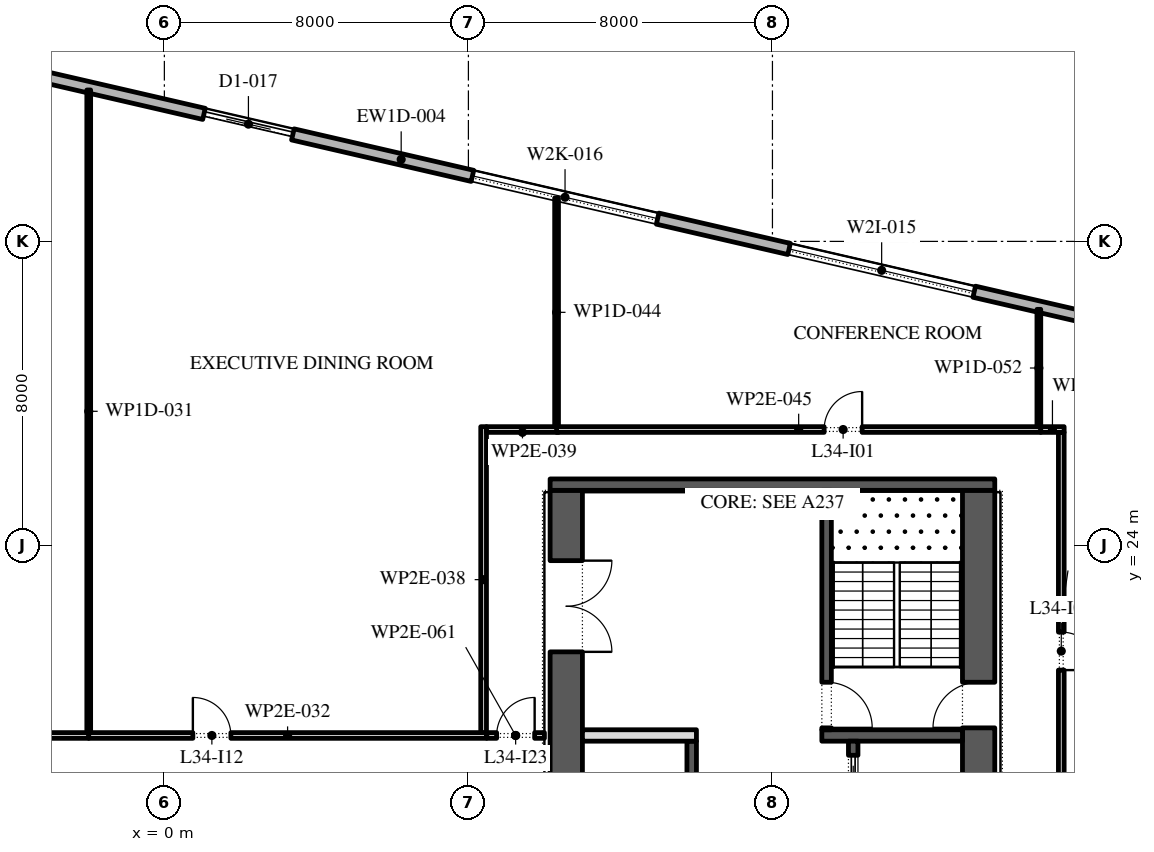
"""IFC4 building model, lengths in metres.
Left out: names, types, materials, properties, quantities, classifications, styles, units other than length and angle.
Written with IfcOpenShell. Run it as: python <this file> out.ifc"""

import sys

from ifc_helpers import new_model, si_unit, direction, frame, frame_2d, origin, place, context, subcontext, project, spatial, rectangle, extrude, element, fill, save


model = new_model("IFC4")
c1 = context("Model", 3, precision=1e-05, world=origin(), true_north=direction((0.0, 1.0)))
c2 = subcontext(c1, "Body", "Model", "MODEL_VIEW")
j1 = project(units=[si_unit("LENGTHUNIT", "METRE"), si_unit("PLANEANGLEUNIT", "RADIAN")], contexts=[c1])
p1 = place(None, origin())
s1 = spatial("IfcSite", under=j1, at=p1, CompositionType="ELEMENT")
p2 = place(p1, origin())
s2 = spatial("IfcBuilding", under=s1, at=p2, CompositionType="ELEMENT")
p3 = place(p2, frame((0.0, 0.0, 156.0)))
s3 = spatial("IfcBuildingStorey", under=s2, at=p3, CompositionType="ELEMENT", Elevation=156.0)
p4 = place(p3, frame((31.078, 28.421, 0.0), z_axis=(0.0, 0.0, 1.0), x_axis=(-0.974370456532, 0.224949357493, 0.0)))
e1 = element("IfcWall", 1, at=p4, inside=s3, PredefinedType="STANDARD", context=c2, shape_type="SweptSolid", body=[
    extrude(rectangle(XDim=51.0, YDim=0.3, at=frame_2d((25.5, 0.0))), origin(), (0.0, 0.0, 1.0), 3.9),
])
p5 = place(p4, frame((1.625, 0.0, 0.45)))
e2 = element("IfcOpeningElement", 2, at=p5, cuts=e1, PredefinedType="OPENING", context=c2, shape_type="SweptSolid", body=[
    extrude(rectangle(XDim=5.0, YDim=2.725, at=frame_2d((2.5, 1.363))), frame((0.0, 0.16, 0.0), z_axis=(0.0, -1.0, 0.0), x_axis=(1.0, 0.0, 0.0)), (0.0, 0.0, 1.0), 0.32),
])
p6 = place(p4, frame((10.025, 0.0, 0.45)))
e3 = element("IfcOpeningElement", 3, at=p6, cuts=e1, PredefinedType="OPENING", context=c2, shape_type="SweptSolid", body=[
    extrude(rectangle(XDim=5.0, YDim=2.65, at=frame_2d((2.5, 1.325))), frame((0.0, 0.16, 0.0), z_axis=(0.0, -1.0, 0.0), x_axis=(1.0, 0.0, 0.0)), (0.0, 0.0, 1.0), 0.32),
])
p7 = place(p4, frame((18.575, 0.0, 0.45)))
e4 = element("IfcOpeningElement", 4, at=p7, cuts=e1, PredefinedType="OPENING", context=c2, shape_type="SweptSolid", body=[
    extrude(rectangle(XDim=5.0, YDim=2.575, at=frame_2d((2.5, 1.288))), frame((0.0, 0.16, 0.0), z_axis=(0.0, -1.0, 0.0), x_axis=(1.0, 0.0, 0.0)), (0.0, 0.0, 1.0), 0.32),
])
p8 = place(p4, frame((28.425, 0.0, 0.0)))
e5 = element("IfcOpeningElement", 5, at=p8, cuts=e1, PredefinedType="OPENING", context=c2, shape_type="SweptSolid", body=[
    extrude(rectangle(XDim=2.4, YDim=3.5, at=frame_2d((1.2, 1.75))), frame((0.0, 0.16, 0.0), z_axis=(0.0, -1.0, 0.0), x_axis=(1.0, 0.0, 0.0)), (0.0, 0.0, 1.0), 0.32),
])
p9 = place(p4, frame((35.675, 0.0, 0.45)))
e6 = element("IfcOpeningElement", 6, at=p9, cuts=e1, PredefinedType="OPENING", context=c2, shape_type="SweptSolid", body=[
    extrude(rectangle(XDim=5.0, YDim=2.4, at=frame_2d((2.5, 1.2))), frame((0.0, 0.16, 0.0), z_axis=(0.0, -1.0, 0.0), x_axis=(1.0, 0.0, 0.0)), (0.0, 0.0, 1.0), 0.32),
])
p10 = place(p4, frame((44.225, 0.0, 0.45)))
e7 = element("IfcOpeningElement", 7, at=p10, cuts=e1, PredefinedType="OPENING", context=c2, shape_type="SweptSolid", body=[
    extrude(rectangle(XDim=5.0, YDim=3.25, at=frame_2d((2.5, 1.625))), frame((0.0, 0.16, 0.0), z_axis=(0.0, -1.0, 0.0), x_axis=(1.0, 0.0, 0.0)), (0.0, 0.0, 1.0), 0.32),
])
p11 = place(p3, frame((21.425, -2.45, 0.0), z_axis=(0.0, 0.0, 1.0), x_axis=(0.0, 1.0, 0.0)))
e8 = element("IfcWall", 8, at=p11, inside=s3, PredefinedType="SHEAR", context=c2, shape_type="SweptSolid", body=[
    extrude(rectangle(XDim=27.9, YDim=0.85, at=frame_2d((13.95, 0.0))), origin(), (0.0, 0.0, 1.0), 3.9),
])
p12 = place(p11, frame((5.05, 0.0, 0.0)))
e9 = element("IfcOpeningElement", 9, at=p12, cuts=e8, PredefinedType="OPENING", context=c2, shape_type="SweptSolid", body=[
    extrude(rectangle(XDim=1.2, YDim=2.1, at=frame_2d((0.6, 1.05))), frame((0.0, 0.435, 0.0), z_axis=(0.0, -1.0, 0.0), x_axis=(1.0, 0.0, 0.0)), (0.0, 0.0, 1.0), 0.87),
])
p13 = place(p11, frame((21.65, 0.0, 0.0)))
e10 = element("IfcOpeningElement", 10, at=p13, cuts=e8, PredefinedType="OPENING", context=c2, shape_type="SweptSolid", body=[
    extrude(rectangle(XDim=1.2, YDim=2.1, at=frame_2d((0.6, 1.05))), frame((0.0, 0.435, 0.0), z_axis=(0.0, -1.0, 0.0), x_axis=(1.0, 0.0, 0.0)), (0.0, 0.0, 1.0), 0.87),
])
p14 = place(p3, frame((10.575, -2.45, 0.0), z_axis=(0.0, 0.0, 1.0), x_axis=(0.0, 1.0, 0.0)))
e11 = element("IfcWall", 11, at=p14, inside=s3, PredefinedType="SHEAR", context=c2, shape_type="SweptSolid", body=[
    extrude(rectangle(XDim=27.9, YDim=0.85, at=frame_2d((13.95, 0.0))), origin(), (0.0, 0.0, 1.0), 3.9),
])
p15 = place(p14, frame((23.65, 0.0, 0.0)))
e12 = element("IfcOpeningElement", 12, at=p15, cuts=e11, PredefinedType="OPENING", context=c2, shape_type="SweptSolid", body=[
    extrude(rectangle(XDim=2.4, YDim=2.1, at=frame_2d((1.2, 1.05))), frame((0.0, 0.435, 0.0), z_axis=(0.0, -1.0, 0.0), x_axis=(1.0, 0.0, 0.0)), (0.0, 0.0, 1.0), 0.87),
])
p16 = place(p14, frame((1.087, 0.0, 0.0)))
e13 = element("IfcOpeningElement", 13, at=p16, cuts=e11, PredefinedType="OPENING", context=c2, shape_type="SweptSolid", body=[
    extrude(rectangle(XDim=0.9, YDim=2.1, at=frame_2d((0.45, 1.05))), frame((0.0, 0.435, 0.0), z_axis=(0.0, -1.0, 0.0), x_axis=(1.0, 0.0, 0.0)), (0.0, 0.0, 1.0), 0.87),
])
p17 = place(p14, frame((4.262, 0.0, 0.0)))
e14 = element("IfcOpeningElement", 14, at=p17, cuts=e11, PredefinedType="OPENING", context=c2, shape_type="SweptSolid", body=[
    extrude(rectangle(XDim=1.0, YDim=2.1, at=frame_2d((0.5, 1.05))), frame((0.0, 0.435, 0.0), z_axis=(0.0, -1.0, 0.0), x_axis=(1.0, 0.0, 0.0)), (0.0, 0.0, 1.0), 0.87),
])
p18 = place(p3, frame((10.15, 25.6, 0.0), z_axis=(0.0, 0.0, 1.0), x_axis=(1.0, 0.0, 0.0)))
e15 = element("IfcWall", 15, at=p18, inside=s3, PredefinedType="SHEAR", context=c2, shape_type="SweptSolid", body=[
    extrude(rectangle(XDim=11.7, YDim=0.3, at=frame_2d((5.85, 0.0))), origin(), (0.0, 0.0, 1.0), 3.9),
])
p19 = place(p3, frame((17.3, 19.0, 0.0), z_axis=(0.0, 0.0, 1.0), x_axis=(1.0, 0.0, 0.0)))
e16 = element("IfcWall", 16, at=p19, inside=s3, PredefinedType="SHEAR", context=c2, shape_type="SweptSolid", body=[
    extrude(rectangle(XDim=3.7, YDim=0.3, at=frame_2d((1.85, 0.0))), origin(), (0.0, 0.0, 1.0), 3.9),
])
p20 = place(p3, frame((17.425, 19.15, 0.0), z_axis=(0.0, 0.0, 1.0), x_axis=(0.0, 1.0, 0.0)))
e17 = element("IfcWall", 17, at=p20, inside=s3, PredefinedType="SHEAR", context=c2, shape_type="SweptSolid", body=[
    extrude(rectangle(XDim=6.3, YDim=0.25, at=frame_2d((3.15, 0.0))), origin(), (0.0, 0.0, 1.0), 3.9),
])
p21 = place(p20, frame((0.05, 0.0, 0.0)))
e18 = element("IfcOpeningElement", 18, at=p21, cuts=e17, PredefinedType="OPENING", context=c2, shape_type="SweptSolid", body=[
    extrude(rectangle(XDim=1.2, YDim=2.1, at=frame_2d((0.6, 1.05))), frame((0.0, 0.135, 0.0), z_axis=(0.0, -1.0, 0.0), x_axis=(1.0, 0.0, 0.0)), (0.0, 0.0, 1.0), 0.27),
])
p22 = place(p3, frame((18.125, 4.15, 0.0), z_axis=(0.0, 0.0, 1.0), x_axis=(0.0, 1.0, 0.0)))
e19 = element("IfcWall", 19, at=p22, inside=s3, PredefinedType="SHEAR", context=c2, shape_type="SweptSolid", body=[
    extrude(rectangle(XDim=14.7, YDim=0.25, at=frame_2d((7.35, 0.0))), origin(), (0.0, 0.0, 1.0), 3.9),
])
p23 = place(p22, frame((0.371, 0.0, 0.0)))
e20 = element("IfcOpeningElement", 20, at=p23, cuts=e19, PredefinedType="OPENING", context=c2, shape_type="SweptSolid", body=[
    extrude(rectangle(XDim=1.1, YDim=2.1, at=frame_2d((0.55, 1.05))), frame((0.0, 0.135, 0.0), z_axis=(0.0, -1.0, 0.0), x_axis=(1.0, 0.0, 0.0)), (0.0, 0.0, 1.0), 0.27),
])
p24 = place(p22, frame((2.514, 0.0, 0.0)))
e21 = element("IfcOpeningElement", 21, at=p24, cuts=e19, PredefinedType="OPENING", context=c2, shape_type="SweptSolid", body=[
    extrude(rectangle(XDim=1.1, YDim=2.1, at=frame_2d((0.55, 1.05))), frame((0.0, 0.135, 0.0), z_axis=(0.0, -1.0, 0.0), x_axis=(1.0, 0.0, 0.0)), (0.0, 0.0, 1.0), 0.27),
])
p25 = place(p22, frame((4.657, 0.0, 0.0)))
e22 = element("IfcOpeningElement", 22, at=p25, cuts=e19, PredefinedType="OPENING", context=c2, shape_type="SweptSolid", body=[
    extrude(rectangle(XDim=1.1, YDim=2.1, at=frame_2d((0.55, 1.05))), frame((0.0, 0.135, 0.0), z_axis=(0.0, -1.0, 0.0), x_axis=(1.0, 0.0, 0.0)), (0.0, 0.0, 1.0), 0.27),
])
p26 = place(p22, frame((6.8, 0.0, 0.0)))
e23 = element("IfcOpeningElement", 23, at=p26, cuts=e19, PredefinedType="OPENING", context=c2, shape_type="SweptSolid", body=[
    extrude(rectangle(XDim=1.1, YDim=2.1, at=frame_2d((0.55, 1.05))), frame((0.0, 0.135, 0.0), z_axis=(0.0, -1.0, 0.0), x_axis=(1.0, 0.0, 0.0)), (0.0, 0.0, 1.0), 0.27),
])
p27 = place(p22, frame((8.943, 0.0, 0.0)))
e24 = element("IfcOpeningElement", 24, at=p27, cuts=e19, PredefinedType="OPENING", context=c2, shape_type="SweptSolid", body=[
    extrude(rectangle(XDim=1.1, YDim=2.1, at=frame_2d((0.55, 1.05))), frame((0.0, 0.135, 0.0), z_axis=(0.0, -1.0, 0.0), x_axis=(1.0, 0.0, 0.0)), (0.0, 0.0, 1.0), 0.27),
])
p28 = place(p22, frame((11.086, 0.0, 0.0)))
e25 = element("IfcOpeningElement", 25, at=p28, cuts=e19, PredefinedType="OPENING", context=c2, shape_type="SweptSolid", body=[
    extrude(rectangle(XDim=1.1, YDim=2.1, at=frame_2d((0.55, 1.05))), frame((0.0, 0.135, 0.0), z_axis=(0.0, -1.0, 0.0), x_axis=(1.0, 0.0, 0.0)), (0.0, 0.0, 1.0), 0.27),
])
p29 = place(p22, frame((13.229, 0.0, 0.0)))
e26 = element("IfcOpeningElement", 26, at=p29, cuts=e19, PredefinedType="OPENING", context=c2, shape_type="SweptSolid", body=[
    extrude(rectangle(XDim=1.1, YDim=2.1, at=frame_2d((0.55, 1.05))), frame((0.0, 0.135, 0.0), z_axis=(0.0, -1.0, 0.0), x_axis=(1.0, 0.0, 0.0)), (0.0, 0.0, 1.0), 0.27),
])
p30 = place(p3, frame((13.875, -2.45, 0.0), z_axis=(0.0, 0.0, 1.0), x_axis=(0.0, 1.0, 0.0)))
e27 = element("IfcWall", 27, at=p30, inside=s3, PredefinedType="SHEAR", context=c2, shape_type="SweptSolid", body=[
    extrude(rectangle(XDim=21.3, YDim=0.25, at=frame_2d((10.65, 0.0))), origin(), (0.0, 0.0, 1.0), 3.9),
])
p31 = place(p30, frame((14.571, 0.0, 0.0)))
e28 = element("IfcOpeningElement", 28, at=p31, cuts=e27, PredefinedType="OPENING", context=c2, shape_type="SweptSolid", body=[
    extrude(rectangle(XDim=0.9, YDim=2.1, at=frame_2d((0.45, 1.05))), frame((0.0, 0.135, 0.0), z_axis=(0.0, -1.0, 0.0), x_axis=(1.0, 0.0, 0.0)), (0.0, 0.0, 1.0), 0.27),
])
p32 = place(p30, frame((6.971, 0.0, 0.0)))
e29 = element("IfcOpeningElement", 29, at=p32, cuts=e27, PredefinedType="OPENING", context=c2, shape_type="SweptSolid", body=[
    extrude(rectangle(XDim=1.1, YDim=2.1, at=frame_2d((0.55, 1.05))), frame((0.0, 0.135, 0.0), z_axis=(0.0, -1.0, 0.0), x_axis=(1.0, 0.0, 0.0)), (0.0, 0.0, 1.0), 0.27),
])
p33 = place(p3, frame((11.0, 19.0, 0.0), z_axis=(0.0, 0.0, 1.0), x_axis=(1.0, 0.0, 0.0)))
e30 = element("IfcWall", 30, at=p33, inside=s3, PredefinedType="PARTITIONING", context=c2, shape_type="SweptSolid", body=[
    extrude(rectangle(XDim=3.0, YDim=0.3, at=frame_2d((1.5, 0.0))), origin(), (0.0, 0.0, 1.0), 3.9),
])
p34 = place(p3, frame((-8.475, 19.0, 0.0), z_axis=(0.0, 0.0, 1.0), x_axis=(1.0, 0.0, 0.0)))
e31 = element("IfcWall", 31, at=p34, inside=s3, PredefinedType="PARTITIONING", context=c2, shape_type="SweptSolid", body=[
    extrude(rectangle(XDim=6.485, YDim=0.15, at=frame_2d((3.243, 0.0))), origin(), (0.0, 0.0, 1.0), 3.9),
])
p35 = place(p3, frame((-1.99, 19.075, 0.0), z_axis=(0.0, 0.0, 1.0), x_axis=(0.0, 1.0, 0.0)))
e32 = element("IfcWall", 32, at=p35, inside=s3, PredefinedType="PARTITIONING", context=c2, shape_type="SweptSolid", body=[
    extrude(rectangle(XDim=16.909, YDim=0.1, at=frame_2d((8.455, 0.0))), origin(), (0.0, 0.0, 1.0), 3.9),
])
p36 = place(p3, frame((-1.99, 19.0, 0.0), z_axis=(0.0, 0.0, 1.0), x_axis=(1.0, 0.0, 0.0)))
e33 = element("IfcWall", 33, at=p36, inside=s3, PredefinedType="PARTITIONING", context=c2, shape_type="SweptSolid", body=[
    extrude(rectangle(XDim=10.465, YDim=0.15, at=frame_2d((5.232, 0.0))), origin(), (0.0, 0.0, 1.0), 3.9),
])
p37 = place(p36, frame((2.74, 0.0, 0.0)))
e34 = element("IfcOpeningElement", 34, at=p37, cuts=e33, PredefinedType="OPENING", context=c2, shape_type="SweptSolid", body=[
    extrude(rectangle(XDim=1.0, YDim=2.1, at=frame_2d((0.5, 1.05))), frame((0.0, 0.085, 0.0), z_axis=(0.0, -1.0, 0.0), x_axis=(1.0, 0.0, 0.0)), (0.0, 0.0, 1.0), 0.17),
])
p38 = place(p3, frame((8.4, 19.075, 0.0), z_axis=(0.0, 0.0, 1.0), x_axis=(0.0, 1.0, 0.0)))
e35 = element("IfcWall", 35, at=p38, inside=s3, PredefinedType="PARTITIONING", context=c2, shape_type="SweptSolid", body=[
    extrude(rectangle(XDim=8.05, YDim=0.15, at=frame_2d((4.025, 0.0))), origin(), (0.0, 0.0, 1.0), 3.9),
])
p39 = place(p3, frame((8.475, 27.05, 0.0), z_axis=(0.0, 0.0, 1.0), x_axis=(1.0, 0.0, 0.0)))
e36 = element("IfcWall", 36, at=p39, inside=s3, PredefinedType="PARTITIONING", context=c2, shape_type="SweptSolid", body=[
    extrude(rectangle(XDim=1.895, YDim=0.15, at=frame_2d((0.948, 0.0))), origin(), (0.0, 0.0, 1.0), 3.9),
])
p40 = place(p3, frame((10.32, 27.125, 0.0), z_axis=(0.0, 0.0, 1.0), x_axis=(0.0, 1.0, 0.0)))
e37 = element("IfcWall", 37, at=p40, inside=s3, PredefinedType="PARTITIONING", context=c2, shape_type="SweptSolid", body=[
    extrude(rectangle(XDim=6.017, YDim=0.1, at=frame_2d((3.009, 0.0))), origin(), (0.0, 0.0, 1.0), 3.9),
])
p41 = place(p3, frame((10.32, 27.05, 0.0), z_axis=(0.0, 0.0, 1.0), x_axis=(1.0, 0.0, 0.0)))
e38 = element("IfcWall", 38, at=p41, inside=s3, PredefinedType="PARTITIONING", context=c2, shape_type="SweptSolid", body=[
    extrude(rectangle(XDim=12.74, YDim=0.15, at=frame_2d((6.37, 0.0))), origin(), (0.0, 0.0, 1.0), 3.9),
])
p42 = place(p41, frame((7.04, 0.0, 0.0)))
e39 = element("IfcOpeningElement", 39, at=p42, cuts=e38, PredefinedType="OPENING", context=c2, shape_type="SweptSolid", body=[
    extrude(rectangle(XDim=1.0, YDim=2.1, at=frame_2d((0.5, 1.05))), frame((0.0, 0.085, 0.0), z_axis=(0.0, -1.0, 0.0), x_axis=(1.0, 0.0, 0.0)), (0.0, 0.0, 1.0), 0.17),
])
p43 = place(p3, frame((23.06, 27.05, 0.0), z_axis=(0.0, 0.0, 1.0), x_axis=(1.0, 0.0, 0.0)))
e40 = element("IfcWall", 40, at=p43, inside=s3, PredefinedType="PARTITIONING", context=c2, shape_type="SweptSolid", body=[
    extrude(rectangle(XDim=0.615, YDim=0.15, at=frame_2d((0.308, 0.0))), origin(), (0.0, 0.0, 1.0), 3.9),
])
p44 = place(p3, frame((23.01, 30.212, 0.0), z_axis=(0.0, 0.0, 1.0), x_axis=(0.0, -1.0, 0.0)))
e41 = element("IfcWall", 41, at=p44, inside=s3, PredefinedType="PARTITIONING", context=c2, shape_type="SweptSolid", body=[
    extrude(rectangle(XDim=3.087, YDim=0.1, at=frame_2d((1.543, 0.0))), origin(), (0.0, 0.0, 1.0), 3.9),
])
p45 = place(p3, frame((23.6, 26.975, 0.0), z_axis=(0.0, 0.0, 1.0), x_axis=(0.0, -1.0, 0.0)))
e42 = element("IfcWall", 42, at=p45, inside=s3, PredefinedType="PARTITIONING", context=c2, shape_type="SweptSolid", body=[
    extrude(rectangle(XDim=9.655, YDim=0.15, at=frame_2d((4.828, 0.0))), origin(), (0.0, 0.0, 1.0), 3.9),
])
p46 = place(p45, frame((5.255, 0.0, 0.0)))
e43 = element("IfcOpeningElement", 43, at=p46, cuts=e42, PredefinedType="OPENING", context=c2, shape_type="SweptSolid", body=[
    extrude(rectangle(XDim=1.0, YDim=2.1, at=frame_2d((0.5, 1.05))), frame((0.0, 0.085, 0.0), z_axis=(0.0, -1.0, 0.0), x_axis=(1.0, 0.0, 0.0)), (0.0, 0.0, 1.0), 0.17),
])
p47 = place(p3, frame((8.485, 19.0, 0.0), z_axis=(0.0, 0.0, 1.0), x_axis=(1.0, 0.0, 0.0)))
e44 = element("IfcWall", 44, at=p47, inside=s3, PredefinedType="PARTITIONING", context=c2, shape_type="SweptSolid", body=[
    extrude(rectangle(XDim=1.515, YDim=0.15, at=frame_2d((0.757, 0.0))), origin(), (0.0, 0.0, 1.0), 3.9),
])
p48 = place(p47, frame((0.258, 0.0, 0.0)))
e45 = element("IfcOpeningElement", 45, at=p48, cuts=e44, PredefinedType="OPENING", context=c2, shape_type="SweptSolid", body=[
    extrude(rectangle(XDim=1.0, YDim=2.1, at=frame_2d((0.5, 1.05))), frame((0.0, 0.085, 0.0), z_axis=(0.0, -1.0, 0.0), x_axis=(1.0, 0.0, 0.0)), (0.0, 0.0, 1.0), 0.17),
])
p49 = place(p6, origin())
e46 = element("IfcWindow", 46, at=p49, inside=s3, PartitioningType="DOUBLE_PANEL_VERTICAL", PredefinedType="WINDOW", context=c2, shape_type="SweptSolid", body=[
    extrude(rectangle(XDim=5.0, YDim=2.65, at=frame_2d((2.5, 1.325))), frame((0.0, 0.03, 0.0), z_axis=(0.0, -1.0, 0.0), x_axis=(1.0, 0.0, 0.0)), (0.0, 0.0, 1.0), 0.06),
])
fill(e3, e46)
p50 = place(p7, origin())
e47 = element("IfcWindow", 47, at=p50, inside=s3, PartitioningType="DOUBLE_PANEL_VERTICAL", PredefinedType="WINDOW", context=c2, shape_type="SweptSolid", body=[
    extrude(rectangle(XDim=5.0, YDim=2.575, at=frame_2d((2.5, 1.288))), frame((0.0, 0.03, 0.0), z_axis=(0.0, -1.0, 0.0), x_axis=(1.0, 0.0, 0.0)), (0.0, 0.0, 1.0), 0.06),
])
fill(e4, e47)
p51 = place(p8, origin())
e48 = element("IfcDoor", 48, at=p51, inside=s3, OperationType="DOUBLE_DOOR_SLIDING", PredefinedType="DOOR", context=c2, shape_type="SweptSolid", body=[
    extrude(rectangle(XDim=2.4, YDim=3.5, at=frame_2d((1.2, 1.75))), frame((0.0, 0.025, 0.0), z_axis=(0.0, -1.0, 0.0), x_axis=(1.0, 0.0, 0.0)), (0.0, 0.0, 1.0), 0.05),
])
fill(e5, e48)
p52 = place(p29, origin())
e49 = element("IfcDoor", 49, at=p52, inside=s3, OperationType="SLIDING_TO_LEFT", PredefinedType="DOOR", context=c2, shape_type="SweptSolid", body=[
    extrude(rectangle(XDim=1.1, YDim=2.1, at=frame_2d((0.55, 1.05))), frame((0.0, 0.025, 0.0), z_axis=(0.0, -1.0, 0.0), x_axis=(1.0, 0.0, 0.0)), (0.0, 0.0, 1.0), 0.05),
])
fill(e26, e49)
p53 = place(p15, frame((2.4, 0.0, 0.0), z_axis=(0.0, 0.0, 1.0), x_axis=(-1.0, 0.0, 0.0)))
e50 = element("IfcDoor", 50, at=p53, inside=s3, OperationType="DOUBLE_DOOR_SINGLE_SWING", PredefinedType="DOOR", context=c2, shape_type="SweptSolid", body=[
    extrude(rectangle(XDim=2.4, YDim=2.1, at=frame_2d((1.2, 1.05))), frame((0.0, 0.025, 0.0), z_axis=(0.0, -1.0, 0.0), x_axis=(1.0, 0.0, 0.0)), (0.0, 0.0, 1.0), 0.05),
])
fill(e12, e50)
p54 = place(p21, frame((1.2, 0.0, 0.0), z_axis=(0.0, 0.0, 1.0), x_axis=(-1.0, 0.0, 0.0)))
e51 = element("IfcDoor", 51, at=p54, inside=s3, OperationType="SINGLE_SWING_LEFT", PredefinedType="DOOR", context=c2, shape_type="SweptSolid", body=[
    extrude(rectangle(XDim=1.2, YDim=2.1, at=frame_2d((0.6, 1.05))), frame((0.0, 0.025, 0.0), z_axis=(0.0, -1.0, 0.0), x_axis=(1.0, 0.0, 0.0)), (0.0, 0.0, 1.0), 0.05),
])
fill(e18, e51)
p55 = place(p13, origin())
e52 = element("IfcDoor", 52, at=p55, inside=s3, OperationType="SINGLE_SWING_RIGHT", PredefinedType="DOOR", context=c2, shape_type="SweptSolid", body=[
    extrude(rectangle(XDim=1.2, YDim=2.1, at=frame_2d((0.6, 1.05))), frame((0.0, 0.025, 0.0), z_axis=(0.0, -1.0, 0.0), x_axis=(1.0, 0.0, 0.0)), (0.0, 0.0, 1.0), 0.05),
])
fill(e10, e52)
p56 = place(p42, origin())
e53 = element("IfcDoor", 53, at=p56, inside=s3, OperationType="SINGLE_SWING_LEFT", PredefinedType="DOOR", context=c2, shape_type="SweptSolid", body=[
    extrude(rectangle(XDim=1.0, YDim=2.1, at=frame_2d((0.5, 1.05))), frame((0.0, 0.025, 0.0), z_axis=(0.0, -1.0, 0.0), x_axis=(1.0, 0.0, 0.0)), (0.0, 0.0, 1.0), 0.05),
])
fill(e39, e53)
p57 = place(p46, origin())
e54 = element("IfcDoor", 54, at=p57, inside=s3, OperationType="SINGLE_SWING_LEFT", PredefinedType="DOOR", context=c2, shape_type="SweptSolid", body=[
    extrude(rectangle(XDim=1.0, YDim=2.1, at=frame_2d((0.5, 1.05))), frame((0.0, 0.025, 0.0), z_axis=(0.0, -1.0, 0.0), x_axis=(1.0, 0.0, 0.0)), (0.0, 0.0, 1.0), 0.05),
])
fill(e43, e54)
p58 = place(p37, origin())
e55 = element("IfcDoor", 55, at=p58, inside=s3, OperationType="SINGLE_SWING_RIGHT", PredefinedType="DOOR", context=c2, shape_type="SweptSolid", body=[
    extrude(rectangle(XDim=1.0, YDim=2.1, at=frame_2d((0.5, 1.05))), frame((0.0, 0.025, 0.0), z_axis=(0.0, -1.0, 0.0), x_axis=(1.0, 0.0, 0.0)), (0.0, 0.0, 1.0), 0.05),
])
fill(e34, e55)
p59 = place(p48, origin())
e56 = element("IfcDoor", 56, at=p59, inside=s3, OperationType="SINGLE_SWING_LEFT", PredefinedType="DOOR", context=c2, shape_type="SweptSolid", body=[
    extrude(rectangle(XDim=1.0, YDim=2.1, at=frame_2d((0.5, 1.05))), frame((0.0, 0.025, 0.0), z_axis=(0.0, -1.0, 0.0), x_axis=(1.0, 0.0, 0.0)), (0.0, 0.0, 1.0), 0.05),
])
fill(e45, e56)
save(model, sys.argv[1])
